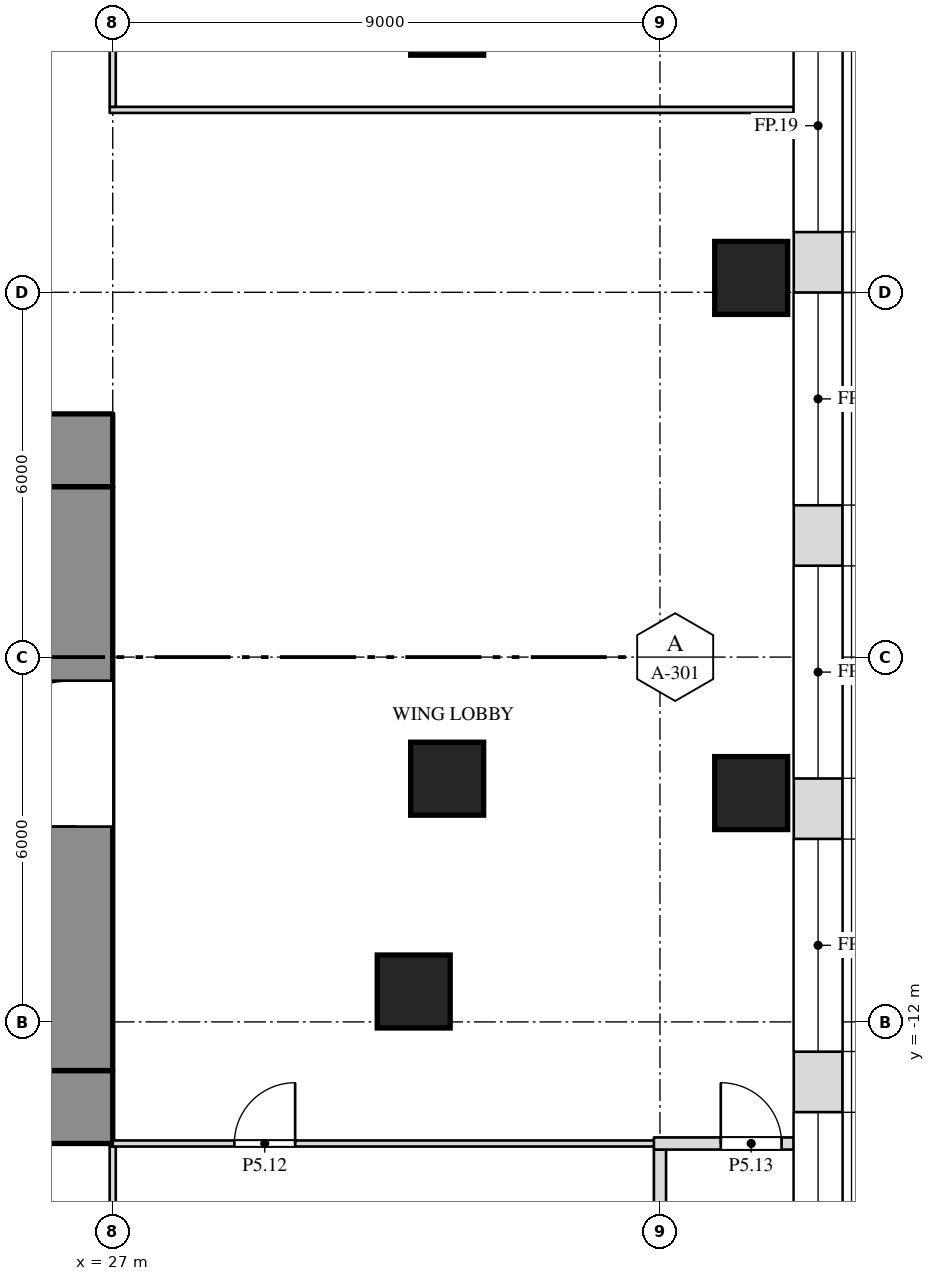
"""IFC4 building model, lengths in metres.
Left out: names, types, materials, properties, quantities, classifications, styles, units other than length and angle.
Written with IfcOpenShell. Run it as: python <this file> out.ifc"""

import sys

from ifc_helpers import new_model, si_unit, direction, frame, frame_2d, origin, origin_2d, place, context, subcontext, project, spatial, rectangle, extrude, element, fill, save


model = new_model("IFC4")
c1 = context("Model", 3, precision=1e-05, world=origin(), true_north=direction((0.0, 1.0)))
c2 = subcontext(c1, "Body", "Model", "MODEL_VIEW")
j1 = project(units=[si_unit("LENGTHUNIT", "METRE"), si_unit("PLANEANGLEUNIT", "RADIAN")], contexts=[c1])
p1 = place(None, origin())
s1 = spatial("IfcSite", under=j1, at=p1, CompositionType="ELEMENT")
p2 = place(p1, origin())
s2 = spatial("IfcBuilding", under=s1, at=p2, CompositionType="ELEMENT")
p3 = place(p2, frame((0.0, 0.0, 33.0)))
s3 = spatial("IfcBuildingStorey", under=s2, at=p3, CompositionType="ELEMENT", Elevation=33.0)
for number, where, z_axis, x_axis in (
    (1, (31.95, -11.5, 0.0), (0.0, 0.0, 1.0), (1.0, 0.0, 0.0)),
    (2, (37.5, -8.236, 0.0), (0.0, 0.0, 1.0), (1.0, 0.0, 0.0)),
    (3, (32.5, -8.0, 0.0), (0.0, 0.0, 1.0), (1.0, 0.0, 0.0)),
    (4, (37.5, 0.236, 0.0), (0.0, 0.0, 1.0), (1.0, 0.0, 0.0)),
    (5, (32.5, 4.5, 0.0), (0.0, 0.0, 1.0), (1.0, 0.0, 0.0)),
):
    element("IfcColumn", number, at=place(p3, frame(where, z_axis=z_axis, x_axis=x_axis)), inside=s3, PredefinedType="COLUMN", context=c2, shape_type="SweptSolid", body=[
        extrude(rectangle(XDim=1.2, YDim=1.2, at=origin_2d()), origin(), (0.0, 0.0, 1.0), 6.0),
    ])
p4 = place(p3, frame((-27.0, -2.6, 0.0), z_axis=(0.0, 0.0, 1.0), x_axis=(1.0, 0.0, 0.0)))
e6 = element("IfcWall", 6, at=p4, inside=s3, PredefinedType="SHEAR", context=c2, shape_type="SweptSolid", body=[
    extrude(rectangle(XDim=54.0, YDim=1.2, at=frame_2d((27.0, 0.0))), origin(), (0.0, 0.0, 1.0), 5.75),
])
p5 = place(p3, frame((-27.0, -13.4, 0.0), z_axis=(0.0, 0.0, 1.0), x_axis=(1.0, 0.0, 0.0)))
e7 = element("IfcWall", 7, at=p5, inside=s3, PredefinedType="SHEAR", context=c2, shape_type="SweptSolid", body=[
    extrude(rectangle(XDim=54.0, YDim=1.2, at=frame_2d((27.0, 0.0))), origin(), (0.0, 0.0, 1.0), 5.75),
])
p6 = place(p5, frame((16.45, 0.0, 0.0)))
e8 = element("IfcOpeningElement", 8, at=p6, cuts=e7, PredefinedType="OPENING", context=c2, shape_type="SweptSolid", body=[
    extrude(rectangle(XDim=1.0, YDim=2.1, at=frame_2d((0.5, 1.05))), frame((0.0, 0.612, 0.0), z_axis=(0.0, -1.0, 0.0), x_axis=(1.0, 0.0, 0.0)), (0.0, 0.0, 1.0), 1.224),
])
p7 = place(p5, frame((36.55, 0.0, 0.0)))
e9 = element("IfcOpeningElement", 9, at=p7, cuts=e7, PredefinedType="OPENING", context=c2, shape_type="SweptSolid", body=[
    extrude(rectangle(XDim=1.0, YDim=2.1, at=frame_2d((0.5, 1.05))), frame((0.0, 0.612, 0.0), z_axis=(0.0, -1.0, 0.0), x_axis=(1.0, 0.0, 0.0)), (0.0, 0.0, 1.0), 1.224),
])
p8 = place(p3, frame((26.4, -12.8, 0.0), z_axis=(0.0, 0.0, 1.0), x_axis=(0.0, 1.0, 0.0)))
e10 = element("IfcWall", 10, at=p8, inside=s3, PredefinedType="SHEAR", context=c2, shape_type="SweptSolid", body=[
    extrude(rectangle(XDim=9.6, YDim=1.2, at=frame_2d((4.8, 0.0))), origin(), (0.0, 0.0, 1.0), 5.75),
])
p9 = place(p8, frame((4.012, 0.0, 0.0)))
e11 = element("IfcOpeningElement", 11, at=p9, cuts=e10, PredefinedType="OPENING", context=c2, shape_type="SweptSolid", body=[
    extrude(rectangle(XDim=2.4, YDim=2.1, at=frame_2d((1.2, 1.05))), frame((0.0, 0.612, 0.0), z_axis=(0.0, -1.0, 0.0), x_axis=(1.0, 0.0, 0.0)), (0.0, 0.0, 1.0), 1.224),
])
p10 = place(p3, frame((36.0, -24.582, 0.0), z_axis=(0.0, 0.0, 1.0), x_axis=(0.0, 1.0, 0.0)))
e12 = element("IfcWall", 12, at=p10, inside=s3, PredefinedType="PARTITIONING", context=c2, shape_type="SweptSolid", body=[
    extrude(rectangle(XDim=10.482, YDim=0.2, at=frame_2d((5.241, 0.0))), origin(), (0.0, 0.0, 1.0), 5.75),
])
p11 = place(p3, frame((27.0, -16.1, 0.0), z_axis=(0.0, 0.0, 1.0), x_axis=(0.0, 1.0, 0.0)))
e13 = element("IfcWall", 13, at=p11, inside=s3, PredefinedType="PARTITIONING", context=c2, shape_type="SweptSolid", body=[
    extrude(rectangle(XDim=2.05, YDim=0.1, at=frame_2d((1.025, 0.0))), origin(), (0.0, 0.0, 1.0), 5.138),
])
p12 = place(p3, frame((27.0, -14.0, 0.0), z_axis=(0.0, 0.0, 1.0), x_axis=(1.0, 0.0, 0.0)))
e14 = element("IfcWall", 14, at=p12, inside=s3, PredefinedType="PARTITIONING", context=c2, shape_type="SweptSolid", body=[
    extrude(rectangle(XDim=9.1, YDim=0.1, at=frame_2d((4.55, 0.0))), origin(), (0.0, 0.0, 1.0), 5.75),
])
p13 = place(p12, frame((2.0, 0.0, 0.0)))
e15 = element("IfcOpeningElement", 15, at=p13, cuts=e14, PredefinedType="OPENING", context=c2, shape_type="SweptSolid", body=[
    extrude(rectangle(XDim=1.0, YDim=2.1, at=frame_2d((0.5, 1.05))), frame((0.0, 0.062, 0.0), z_axis=(0.0, -1.0, 0.0), x_axis=(1.0, 0.0, 0.0)), (0.0, 0.0, 1.0), 0.124),
])
p14 = place(p3, frame((35.9, -14.0, 0.0), z_axis=(0.0, 0.0, 1.0), x_axis=(1.0, 0.0, 0.0)))
e16 = element("IfcWall", 16, at=p14, inside=s3, PredefinedType="PARTITIONING", context=c2, shape_type="SweptSolid", body=[
    extrude(rectangle(XDim=2.3, YDim=0.2, at=frame_2d((1.15, 0.0))), origin(), (0.0, 0.0, 1.0), 5.75),
])
p15 = place(p14, frame((1.1, 0.0, 0.0)))
e17 = element("IfcOpeningElement", 17, at=p15, cuts=e16, PredefinedType="OPENING", context=c2, shape_type="SweptSolid", body=[
    extrude(rectangle(XDim=1.0, YDim=2.1, at=frame_2d((0.5, 1.05))), frame((0.0, 0.112, 0.0), z_axis=(0.0, -1.0, 0.0), x_axis=(1.0, 0.0, 0.0)), (0.0, 0.0, 1.0), 0.224),
])
p16 = place(p3, frame((26.95, 3.0, 0.0), z_axis=(0.0, 0.0, 1.0), x_axis=(1.0, 0.0, 0.0)))
e18 = element("IfcWall", 18, at=p16, inside=s3, PredefinedType="PARTITIONING", context=c2, shape_type="SweptSolid", body=[
    extrude(rectangle(XDim=11.25, YDim=0.1, at=frame_2d((5.625, 0.0))), origin(), (0.0, 0.0, 1.0), 5.75),
])
p17 = place(p3, frame((27.0, 3.05, 0.0), z_axis=(0.0, 0.0, 1.0), x_axis=(0.0, 1.0, 0.0)))
e19 = element("IfcWall", 19, at=p17, inside=s3, PredefinedType="PARTITIONING", context=c2, shape_type="SweptSolid", body=[
    extrude(rectangle(XDim=1.166, YDim=0.1, at=frame_2d((0.583, 0.0))), origin(), (0.0, 0.0, 1.0), 5.138),
])
p18 = place(p3, frame((38.6, -21.948, 0.0), z_axis=(0.0, 0.0, 1.0), x_axis=(0.0, 1.0, 0.0)))
e20 = element("IfcWall", 20, at=p18, inside=s3, PredefinedType="SOLIDWALL", context=c2, shape_type="SweptSolid", body=[
    extrude(rectangle(XDim=35.895, YDim=0.8, at=frame_2d((17.948, 0.0))), origin(), (0.0, 0.0, 1.0), 5.75),
])
p19 = place(p18, frame((4.964, 0.0, 1.0)))
e21 = element("IfcOpeningElement", 21, at=p19, cuts=e20, PredefinedType="OPENING", context=c2, shape_type="SweptSolid", body=[
    extrude(rectangle(XDim=3.5, YDim=4.0, at=frame_2d((1.75, 2.0))), frame((0.0, 0.412, 0.0), z_axis=(0.0, -1.0, 0.0), x_axis=(1.0, 0.0, 0.0)), (0.0, 0.0, 1.0), 0.824),
])
p20 = place(p18, frame((9.458, 0.0, 1.0)))
e22 = element("IfcOpeningElement", 22, at=p20, cuts=e20, PredefinedType="OPENING", context=c2, shape_type="SweptSolid", body=[
    extrude(rectangle(XDim=3.5, YDim=4.0, at=frame_2d((1.75, 2.0))), frame((0.0, 0.412, 0.0), z_axis=(0.0, -1.0, 0.0), x_axis=(1.0, 0.0, 0.0)), (0.0, 0.0, 1.0), 0.824),
])
p21 = place(p18, frame((13.951, 0.0, 1.0)))
e23 = element("IfcOpeningElement", 23, at=p21, cuts=e20, PredefinedType="OPENING", context=c2, shape_type="SweptSolid", body=[
    extrude(rectangle(XDim=3.5, YDim=4.0, at=frame_2d((1.75, 2.0))), frame((0.0, 0.412, 0.0), z_axis=(0.0, -1.0, 0.0), x_axis=(1.0, 0.0, 0.0)), (0.0, 0.0, 1.0), 0.824),
])
p22 = place(p18, frame((18.444, 0.0, 1.0)))
e24 = element("IfcOpeningElement", 24, at=p22, cuts=e20, PredefinedType="OPENING", context=c2, shape_type="SweptSolid", body=[
    extrude(rectangle(XDim=3.5, YDim=4.0, at=frame_2d((1.75, 2.0))), frame((0.0, 0.412, 0.0), z_axis=(0.0, -1.0, 0.0), x_axis=(1.0, 0.0, 0.0)), (0.0, 0.0, 1.0), 0.824),
])
p23 = place(p18, frame((22.938, 0.0, 1.0)))
e25 = element("IfcOpeningElement", 25, at=p23, cuts=e20, PredefinedType="OPENING", context=c2, shape_type="SweptSolid", body=[
    extrude(rectangle(XDim=3.5, YDim=4.0, at=frame_2d((1.75, 2.0))), frame((0.0, 0.412, 0.0), z_axis=(0.0, -1.0, 0.0), x_axis=(1.0, 0.0, 0.0)), (0.0, 0.0, 1.0), 0.824),
])
p24 = place(p18, frame((27.431, 0.0, 1.0)))
e26 = element("IfcOpeningElement", 26, at=p24, cuts=e20, PredefinedType="OPENING", context=c2, shape_type="SweptSolid", body=[
    extrude(rectangle(XDim=3.5, YDim=4.0, at=frame_2d((1.75, 2.0))), frame((0.0, 0.412, 0.0), z_axis=(0.0, -1.0, 0.0), x_axis=(1.0, 0.0, 0.0)), (0.0, 0.0, 1.0), 0.824),
])
p25 = place(p13, origin())
e27 = element("IfcDoor", 27, at=p25, inside=s3, OperationType="SINGLE_SWING_RIGHT", PredefinedType="DOOR", context=c2, shape_type="SweptSolid", body=[
    extrude(rectangle(XDim=1.0, YDim=2.1, at=frame_2d((0.5, 1.05))), frame((0.0, 0.025, 0.0), z_axis=(0.0, -1.0, 0.0), x_axis=(1.0, 0.0, 0.0)), (0.0, 0.0, 1.0), 0.05),
])
fill(e15, e27)
p26 = place(p15, origin())
e28 = element("IfcDoor", 28, at=p26, inside=s3, OperationType="SINGLE_SWING_LEFT", PredefinedType="DOOR", context=c2, shape_type="SweptSolid", body=[
    extrude(rectangle(XDim=1.0, YDim=2.1, at=frame_2d((0.5, 1.05))), frame((0.0, 0.025, 0.0), z_axis=(0.0, -1.0, 0.0), x_axis=(1.0, 0.0, 0.0)), (0.0, 0.0, 1.0), 0.05),
])
fill(e17, e28)
p27 = place(p19, origin())
e29 = element("IfcWindow", 29, at=p27, inside=s3, PartitioningType="SINGLE_PANEL", PredefinedType="WINDOW", context=c2, shape_type="SweptSolid", body=[
    extrude(rectangle(XDim=3.5, YDim=4.0, at=frame_2d((1.75, 2.0))), frame((0.0, 0.03, 0.0), z_axis=(0.0, -1.0, 0.0), x_axis=(1.0, 0.0, 0.0)), (0.0, 0.0, 1.0), 0.06),
])
fill(e21, e29)
p28 = place(p20, origin())
e30 = element("IfcWindow", 30, at=p28, inside=s3, PartitioningType="SINGLE_PANEL", PredefinedType="WINDOW", context=c2, shape_type="SweptSolid", body=[
    extrude(rectangle(XDim=3.5, YDim=4.0, at=frame_2d((1.75, 2.0))), frame((0.0, 0.03, 0.0), z_axis=(0.0, -1.0, 0.0), x_axis=(1.0, 0.0, 0.0)), (0.0, 0.0, 1.0), 0.06),
])
fill(e22, e30)
p29 = place(p21, origin())
e31 = element("IfcWindow", 31, at=p29, inside=s3, PartitioningType="SINGLE_PANEL", PredefinedType="WINDOW", context=c2, shape_type="SweptSolid", body=[
    extrude(rectangle(XDim=3.5, YDim=4.0, at=frame_2d((1.75, 2.0))), frame((0.0, 0.03, 0.0), z_axis=(0.0, -1.0, 0.0), x_axis=(1.0, 0.0, 0.0)), (0.0, 0.0, 1.0), 0.06),
])
fill(e23, e31)
p30 = place(p22, origin())
e32 = element("IfcWindow", 32, at=p30, inside=s3, PartitioningType="SINGLE_PANEL", PredefinedType="WINDOW", context=c2, shape_type="SweptSolid", body=[
    extrude(rectangle(XDim=3.5, YDim=4.0, at=frame_2d((1.75, 2.0))), frame((0.0, 0.03, 0.0), z_axis=(0.0, -1.0, 0.0), x_axis=(1.0, 0.0, 0.0)), (0.0, 0.0, 1.0), 0.06),
])
fill(e24, e32)
p31 = place(p23, origin())
e33 = element("IfcWindow", 33, at=p31, inside=s3, PartitioningType="SINGLE_PANEL", PredefinedType="WINDOW", context=c2, shape_type="SweptSolid", body=[
    extrude(rectangle(XDim=3.5, YDim=4.0, at=frame_2d((1.75, 2.0))), frame((0.0, 0.03, 0.0), z_axis=(0.0, -1.0, 0.0), x_axis=(1.0, 0.0, 0.0)), (0.0, 0.0, 1.0), 0.06),
])
fill(e25, e33)
p32 = place(p9, origin())
e34 = element("IfcDoor", 34, at=p32, inside=s3, OperationType="DOUBLE_DOOR_SINGLE_SWING", PredefinedType="DOOR", context=c2, shape_type="SweptSolid", body=[
    extrude(rectangle(XDim=2.4, YDim=2.1, at=frame_2d((1.2, 1.05))), frame((0.0, 0.025, 0.0), z_axis=(0.0, -1.0, 0.0), x_axis=(1.0, 0.0, 0.0)), (0.0, 0.0, 1.0), 0.05),
])
fill(e11, e34)
save(model, sys.argv[1])
